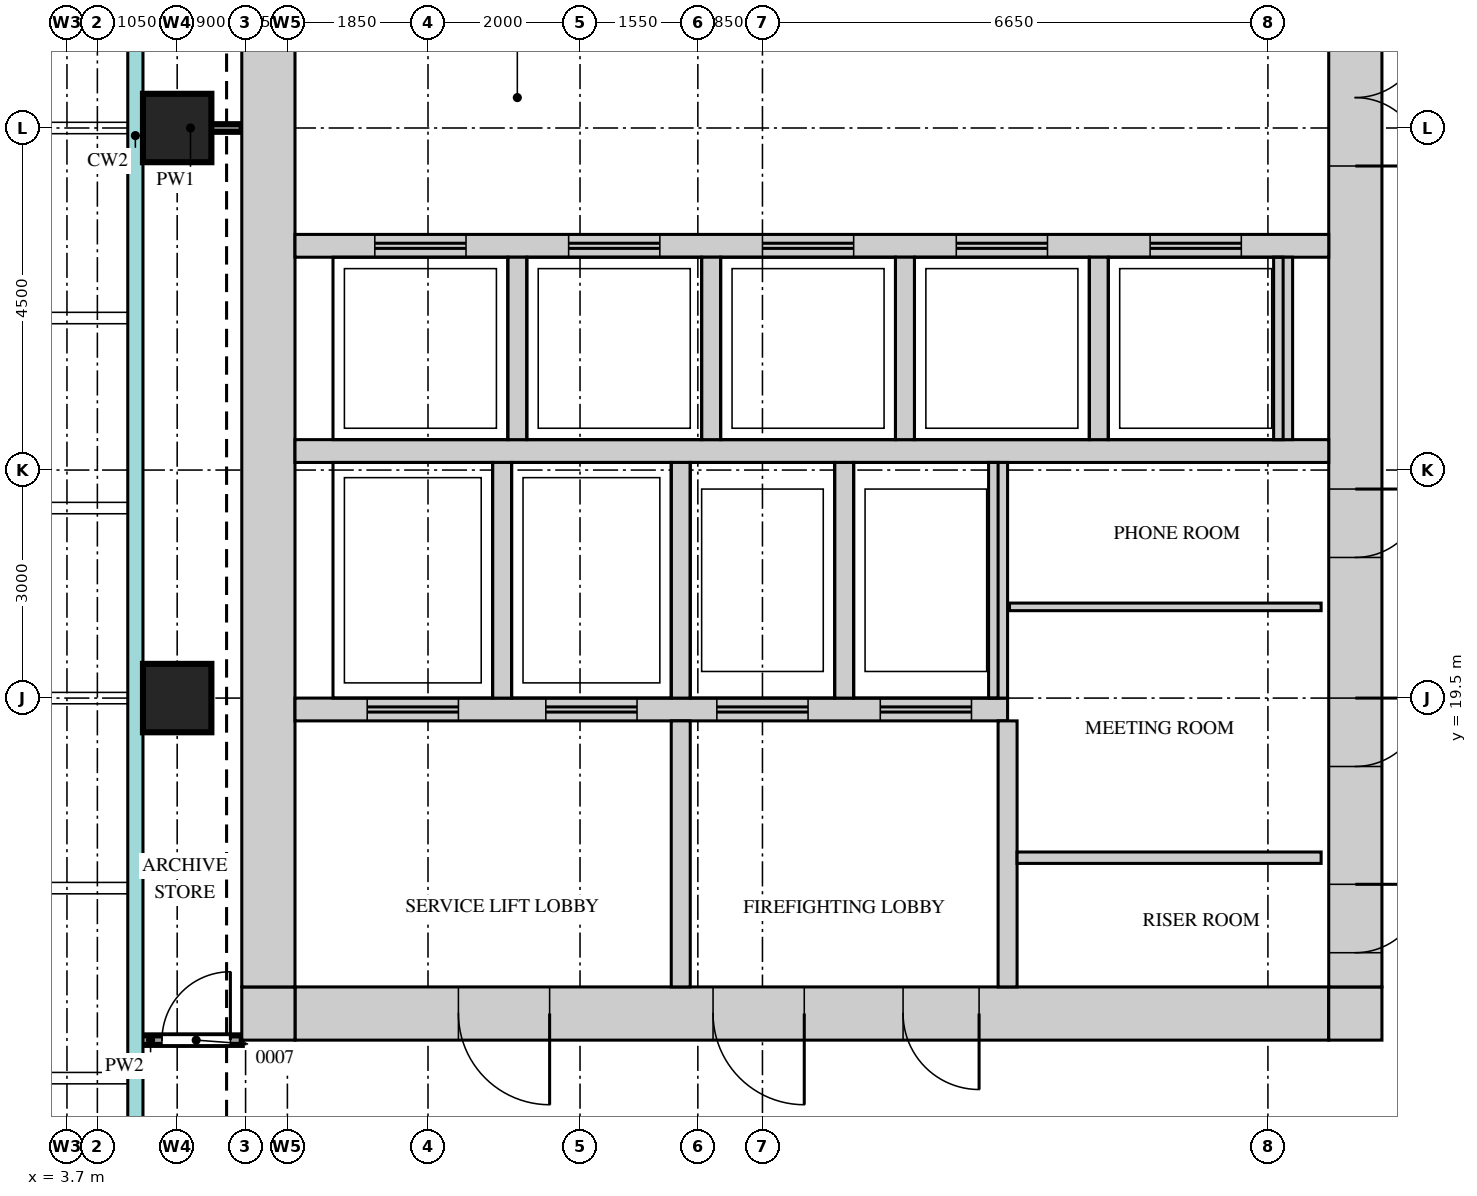
"""IFC4 building model, lengths in metres.
Left out: names, types, materials, properties, quantities, classifications, styles, units other than length and angle.
Written with IfcOpenShell. Run it as: python <this file> out.ifc"""

import sys

from ifc_helpers import new_model, si_unit, direction, frame, frame_2d, origin, origin_2d, place, context, subcontext, project, spatial, rectangle, extrude, source, transform, mapped, element, fill, save


model = new_model("IFC4")
c1 = context("Model", 3, precision=1e-05, world=origin(), true_north=direction((0.0, 1.0)))
c2 = subcontext(c1, "Body", "Model", "MODEL_VIEW")
j1 = project(units=[si_unit("LENGTHUNIT", "METRE"), si_unit("PLANEANGLEUNIT", "RADIAN")], contexts=[c1])
p1 = place(None, origin())
s1 = spatial("IfcSite", under=j1, at=p1, CompositionType="ELEMENT")
p2 = place(p1, origin())
s2 = spatial("IfcBuilding", under=s1, at=p2, CompositionType="ELEMENT")
p3 = place(p2, frame((0.0, 0.0, 222.2)))
s3 = spatial("IfcBuildingStorey", under=s2, at=p3, CompositionType="ELEMENT", Elevation=222.2)
m1 = source(origin(), c2, "Body", "SweptSolid", [
    extrude(rectangle(XDim=13.6, YDim=0.7, at=frame_2d((6.8, 0.0))), origin(), (0.0, 0.0, 1.0), 3.75),
])
p4 = place(p3, frame((6.7, 15.35, 0.0), z_axis=(0.0, 0.0, 1.0), x_axis=(1.0, 0.0, 0.0)))
e1 = element("IfcWall", 1, at=p4, inside=s3, PredefinedType="SHEAR", context=c2, shape_type="MappedRepresentation", body=[
    mapped(m1, transform((0.0, 0.0, 0.0))),
])
m2 = source(origin(), c2, "Body", "SweptSolid", [
    extrude(rectangle(XDim=1.2, YDim=2.1, at=frame_2d((0.6, 1.05))), frame((0.0, 0.36, 0.0), z_axis=(0.0, -1.0, 0.0), x_axis=(1.0, 0.0, 0.0)), (0.0, 0.0, 1.0), 0.72),
])
p5 = place(p4, frame((5.5, 0.0, 0.0)))
e2 = element("IfcOpeningElement", 2, at=p5, cuts=e1, PredefinedType="OPENING", context=c2, shape_type="MappedRepresentation", body=[
    mapped(m2, transform((0.0, 0.0, 0.0))),
])
p6 = place(p4, frame((2.15, 0.0, 0.0)))
e3 = element("IfcOpeningElement", 3, at=p6, cuts=e1, PredefinedType="OPENING", context=c2, shape_type="MappedRepresentation", body=[
    mapped(m2, transform((0.0, 0.0, 0.0))),
])
m3 = source(origin(), c2, "Body", "SweptSolid", [
    extrude(rectangle(XDim=1.0, YDim=2.1, at=frame_2d((0.5, 1.05))), frame((0.0, 0.36, 0.0), z_axis=(0.0, -1.0, 0.0), x_axis=(1.0, 0.0, 0.0)), (0.0, 0.0, 1.0), 0.72),
])
p7 = place(p4, frame((8.0, 0.0, 0.0)))
e4 = element("IfcOpeningElement", 4, at=p7, cuts=e1, PredefinedType="OPENING", context=c2, shape_type="MappedRepresentation", body=[
    mapped(m3, transform((0.0, 0.0, 0.0))),
])
m4 = source(origin(), c2, "Body", "SweptSolid", [
    extrude(rectangle(XDim=0.7, YDim=0.7, at=frame_2d((0.35, 0.0))), origin(), (0.0, 0.0, 1.0), 3.75),
])
for number, where, z_axis, x_axis in (
    (5, (20.3, 15.35, 0.0), (0.0, 0.0, 1.0), (1.0, 0.0, 0.0)),
    (6, (6.0, 15.35, 0.0), (0.0, 0.0, 1.0), (1.0, 0.0, 0.0)),
):
    element("IfcWall", number, at=place(p3, frame(where, z_axis=z_axis, x_axis=x_axis)), inside=s3, PredefinedType="SHEAR", context=c2, shape_type="MappedRepresentation", body=[
        mapped(m4, transform((0.0, 0.0, 0.0))),
    ])
m5 = source(origin(), c2, "Body", "SweptSolid", [
    extrude(rectangle(XDim=22.6, YDim=0.7, at=frame_2d((11.3, 0.0))), origin(), (0.0, 0.0, 1.0), 3.75),
])
p8 = place(p3, frame((20.65, 15.7, 0.0), z_axis=(0.0, 0.0, 1.0), x_axis=(0.0, 1.0, 0.0)))
e7 = element("IfcWall", 7, at=p8, inside=s3, PredefinedType="SHEAR", context=c2, shape_type="MappedRepresentation", body=[
    mapped(m5, transform((0.0, 0.0, 0.0))),
])
m6 = source(origin(), c2, "Body", "SweptSolid", [
    extrude(rectangle(XDim=1.8, YDim=2.1, at=frame_2d((0.9, 1.05))), frame((0.0, 0.36, 0.0), z_axis=(0.0, -1.0, 0.0), x_axis=(1.0, 0.0, 0.0)), (0.0, 0.0, 1.0), 0.72),
])
p9 = place(p8, frame((10.8, 0.0, 0.0)))
e8 = element("IfcOpeningElement", 8, at=p9, cuts=e7, PredefinedType="OPENING", context=c2, shape_type="MappedRepresentation", body=[
    mapped(m6, transform((0.0, 0.0, 0.0))),
])
m7 = source(origin(), c2, "Body", "SweptSolid", [
    extrude(rectangle(XDim=0.9, YDim=2.1, at=frame_2d((0.45, 1.05))), frame((0.0, 0.36, 0.0), z_axis=(0.0, -1.0, 0.0), x_axis=(1.0, 0.0, 0.0)), (0.0, 0.0, 1.0), 0.72),
])
p10 = place(p8, frame((0.45, 0.0, 0.0)))
e9 = element("IfcOpeningElement", 9, at=p10, cuts=e7, PredefinedType="OPENING", context=c2, shape_type="MappedRepresentation", body=[
    mapped(m7, transform((0.0, 0.0, 0.0))),
])
p11 = place(p8, frame((2.9, 0.0, 0.0)))
e10 = element("IfcOpeningElement", 10, at=p11, cuts=e7, PredefinedType="OPENING", context=c2, shape_type="MappedRepresentation", body=[
    mapped(m7, transform((0.0, 0.0, 0.0))),
])
p12 = place(p8, frame((5.65, 0.0, 0.0)))
e11 = element("IfcOpeningElement", 11, at=p12, cuts=e7, PredefinedType="OPENING", context=c2, shape_type="MappedRepresentation", body=[
    mapped(m7, transform((0.0, 0.0, 0.0))),
])
p13 = place(p3, frame((6.35, 15.7, 0.0), z_axis=(0.0, 0.0, 1.0), x_axis=(0.0, 1.0, 0.0)))
e12 = element("IfcWall", 12, at=p13, inside=s3, PredefinedType="SHEAR", context=c2, shape_type="MappedRepresentation", body=[
    mapped(m5, transform((0.0, 0.0, 0.0))),
])
m8 = source(origin(), c2, "Body", "SweptSolid", [
    extrude(rectangle(XDim=13.6, YDim=0.3, at=frame_2d((6.8, 0.0))), origin(), (0.0, 0.0, 1.0), 3.75),
])
p14 = place(p3, frame((6.7, 22.75, 0.0), z_axis=(0.0, 0.0, 1.0), x_axis=(1.0, 0.0, 0.0)))
e13 = element("IfcWall", 13, at=p14, inside=s3, PredefinedType="STANDARD", context=c2, shape_type="MappedRepresentation", body=[
    mapped(m8, transform((0.0, 0.0, 0.0))),
])
m9 = source(origin(), c2, "Body", "SweptSolid", [
    extrude(rectangle(XDim=9.375, YDim=0.3, at=frame_2d((4.688, 0.0))), origin(), (0.0, 0.0, 1.0), 3.75),
])
p15 = place(p3, frame((6.7, 19.35, 0.0), z_axis=(0.0, 0.0, 1.0), x_axis=(1.0, 0.0, 0.0)))
e14 = element("IfcWall", 14, at=p15, inside=s3, PredefinedType="STANDARD", context=c2, shape_type="MappedRepresentation", body=[
    mapped(m9, transform((0.0, 0.0, 0.0))),
])
m10 = source(origin(), c2, "Body", "SweptSolid", [
    extrude(rectangle(XDim=1.2, YDim=2.1, at=frame_2d((0.6, 1.05))), frame((0.0, 0.16, 0.0), z_axis=(0.0, -1.0, 0.0), x_axis=(1.0, 0.0, 0.0)), (0.0, 0.0, 1.0), 0.32),
])
p16 = place(p15, frame((0.95, 0.0, 0.0)))
e15 = element("IfcOpeningElement", 15, at=p16, cuts=e14, PredefinedType="OPENING", context=c2, shape_type="MappedRepresentation", body=[
    mapped(m10, transform((0.0, 0.0, 0.0))),
])
p17 = place(p15, frame((3.3, 0.0, 0.0)))
e16 = element("IfcOpeningElement", 16, at=p17, cuts=e14, PredefinedType="OPENING", context=c2, shape_type="MappedRepresentation", body=[
    mapped(m10, transform((0.0, 0.0, 0.0))),
])
p18 = place(p15, frame((5.55, 0.0, 0.0)))
e17 = element("IfcOpeningElement", 17, at=p18, cuts=e14, PredefinedType="OPENING", context=c2, shape_type="MappedRepresentation", body=[
    mapped(m10, transform((0.0, 0.0, 0.0))),
])
p19 = place(p15, frame((7.7, 0.0, 0.0)))
e18 = element("IfcOpeningElement", 18, at=p19, cuts=e14, PredefinedType="OPENING", context=c2, shape_type="MappedRepresentation", body=[
    mapped(m10, transform((0.0, 0.0, 0.0))),
])
p20 = place(p3, frame((6.7, 25.45, 0.0), z_axis=(0.0, 0.0, 1.0), x_axis=(1.0, 0.0, 0.0)))
e19 = element("IfcWall", 19, at=p20, inside=s3, PredefinedType="STANDARD", context=c2, shape_type="MappedRepresentation", body=[
    mapped(m8, transform((0.0, 0.0, 0.0))),
])
p21 = place(p20, frame((1.05, 0.0, 0.0)))
e20 = element("IfcOpeningElement", 20, at=p21, cuts=e19, PredefinedType="OPENING", context=c2, shape_type="MappedRepresentation", body=[
    mapped(m10, transform((0.0, 0.0, 0.0))),
])
p22 = place(p20, frame((3.6, 0.0, 0.0)))
e21 = element("IfcOpeningElement", 21, at=p22, cuts=e19, PredefinedType="OPENING", context=c2, shape_type="MappedRepresentation", body=[
    mapped(m10, transform((0.0, 0.0, 0.0))),
])
p23 = place(p20, frame((6.15, 0.0, 0.0)))
e22 = element("IfcOpeningElement", 22, at=p23, cuts=e19, PredefinedType="OPENING", context=c2, shape_type="MappedRepresentation", body=[
    mapped(m10, transform((0.0, 0.0, 0.0))),
])
p24 = place(p20, frame((8.7, 0.0, 0.0)))
e23 = element("IfcOpeningElement", 23, at=p24, cuts=e19, PredefinedType="OPENING", context=c2, shape_type="MappedRepresentation", body=[
    mapped(m10, transform((0.0, 0.0, 0.0))),
])
p25 = place(p20, frame((11.25, 0.0, 0.0)))
e24 = element("IfcOpeningElement", 24, at=p25, cuts=e19, PredefinedType="OPENING", context=c2, shape_type="MappedRepresentation", body=[
    mapped(m10, transform((0.0, 0.0, 0.0))),
])
m11 = source(origin(), c2, "Body", "SweptSolid", [
    extrude(rectangle(XDim=3.1, YDim=0.25, at=frame_2d((1.55, 0.0))), origin(), (0.0, 0.0, 1.0), 3.75),
])
for number, where, z_axis, x_axis in (
    (25, (9.425, 19.5, 0.0), (0.0, 0.0, 1.0), (0.0, 1.0, 0.0)),
    (26, (11.775, 19.5, 0.0), (0.0, 0.0, 1.0), (0.0, 1.0, 0.0)),
    (27, (13.925, 19.5, 0.0), (0.0, 0.0, 1.0), (0.0, 1.0, 0.0)),
    (28, (15.95, 19.5, 0.0), (0.0, 0.0, 1.0), (0.0, 1.0, 0.0)),
):
    element("IfcWall", number, at=place(p3, frame(where, z_axis=z_axis, x_axis=x_axis)), inside=s3, PredefinedType="STANDARD", context=c2, shape_type="MappedRepresentation", body=[
        mapped(m11, transform((0.0, 0.0, 0.0))),
    ])
m12 = source(origin(), c2, "Body", "SweptSolid", [
    extrude(rectangle(XDim=2.4, YDim=0.25, at=frame_2d((1.2, 0.0))), origin(), (0.0, 0.0, 1.0), 3.75),
])
for number, where, z_axis, x_axis in (
    (29, (17.275, 22.9, 0.0), (0.0, 0.0, 1.0), (0.0, 1.0, 0.0)),
    (30, (19.7, 22.9, 0.0), (0.0, 0.0, 1.0), (0.0, 1.0, 0.0)),
    (31, (9.625, 22.9, 0.0), (0.0, 0.0, 1.0), (0.0, 1.0, 0.0)),
    (32, (12.175, 22.9, 0.0), (0.0, 0.0, 1.0), (0.0, 1.0, 0.0)),
    (33, (14.725, 22.9, 0.0), (0.0, 0.0, 1.0), (0.0, 1.0, 0.0)),
):
    element("IfcWall", number, at=place(p3, frame(where, z_axis=z_axis, x_axis=x_axis)), inside=s3, PredefinedType="STANDARD", context=c2, shape_type="MappedRepresentation", body=[
        mapped(m12, transform((0.0, 0.0, 0.0))),
    ])
m13 = source(origin(), c2, "Body", "SweptSolid", [
    extrude(rectangle(XDim=3.5, YDim=0.25, at=frame_2d((1.75, 0.0))), origin(), (0.0, 0.0, 1.0), 3.75),
])
for number, where, z_axis, x_axis in (
    (34, (16.075, 15.7, 0.0), (0.0, 0.0, 1.0), (0.0, 1.0, 0.0)),
    (35, (11.775, 15.7, 0.0), (0.0, 0.0, 1.0), (0.0, 1.0, 0.0)),
):
    element("IfcWall", number, at=place(p3, frame(where, z_axis=z_axis, x_axis=x_axis)), inside=s3, PredefinedType="STANDARD", context=c2, shape_type="MappedRepresentation", body=[
        mapped(m13, transform((0.0, 0.0, 0.0))),
    ])
m14 = source(origin(), c2, "Body", "SweptSolid", [
    extrude(rectangle(XDim=0.9, YDim=0.9, at=origin_2d()), origin(), (0.0, 0.0, 1.0), 3.75),
])
for number, where, z_axis, x_axis in (
    (36, (5.15, 19.5, 0.0), (0.0, 0.0, 1.0), (1.0, 0.0, 0.0)),
    (37, (5.15, 27.0, 0.0), (0.0, 0.0, 1.0), (1.0, 0.0, 0.0)),
):
    element("IfcColumn", number, at=place(p3, frame(where, z_axis=z_axis, x_axis=x_axis)), inside=s3, PredefinedType="COLUMN", context=c2, shape_type="MappedRepresentation", body=[
        mapped(m14, transform((0.0, 0.0, 0.0))),
    ])
m15 = source(origin(), c2, "Body", "SweptSolid", [
    extrude(rectangle(XDim=1.35, YDim=0.125, at=frame_2d((0.675, 0.0))), origin(), (0.0, 0.0, 1.0), 3.8),
])
p26 = place(p3, frame((4.65, 15.0, 0.0), z_axis=(0.0, 0.0, 1.0), x_axis=(1.0, 0.0, 0.0)))
e38 = element("IfcWall", 38, at=p26, inside=s3, PredefinedType="PARTITIONING", context=c2, shape_type="MappedRepresentation", body=[
    mapped(m15, transform((0.0, 0.0, 0.0))),
])
m16 = source(origin(), c2, "Body", "SweptSolid", [
    extrude(rectangle(XDim=0.9, YDim=2.1, at=frame_2d((0.45, 1.05))), frame((0.0, 0.073, 0.0), z_axis=(0.0, -1.0, 0.0), x_axis=(1.0, 0.0, 0.0)), (0.0, 0.0, 1.0), 0.145),
])
p27 = place(p26, frame((0.3, 0.0, 0.0)))
e39 = element("IfcOpeningElement", 39, at=p27, cuts=e38, PredefinedType="OPENING", context=c2, shape_type="MappedRepresentation", body=[
    mapped(m16, transform((0.0, 0.0, 0.0))),
])
m17 = source(origin(), c2, "Body", "SweptSolid", [
    extrude(rectangle(XDim=4.0, YDim=0.15, at=frame_2d((2.0, 0.0))), origin(), (0.0, 0.0, 1.0), 3.8),
])
p28 = place(p3, frame((16.2, 17.4, 0.0), z_axis=(0.0, 0.0, 1.0), x_axis=(1.0, 0.0, 0.0)))
e40 = element("IfcWall", 40, at=p28, inside=s3, PredefinedType="PARTITIONING", context=c2, shape_type="MappedRepresentation", body=[
    mapped(m17, transform((0.0, 0.0, 0.0))),
])
m18 = source(origin(), c2, "Body", "SweptSolid", [
    extrude(rectangle(XDim=4.1, YDim=0.1, at=frame_2d((2.05, 0.0))), origin(), (0.0, 0.0, 1.0), 3.8),
])
p29 = place(p3, frame((16.1, 20.7, 0.0), z_axis=(0.0, 0.0, 1.0), x_axis=(1.0, 0.0, 0.0)))
e41 = element("IfcWall", 41, at=p29, inside=s3, PredefinedType="PARTITIONING", context=c2, shape_type="MappedRepresentation", body=[
    mapped(m18, transform((0.0, 0.0, 0.0))),
])
m19 = source(origin(), c2, "Body", "SweptSolid", [
    extrude(rectangle(XDim=1.35, YDim=0.1, at=frame_2d((0.675, 0.0))), origin(), (0.0, 0.0, 1.0), 3.8),
])
p30 = place(p3, frame((4.65, 27.0, 0.0), z_axis=(0.0, 0.0, 1.0), x_axis=(1.0, 0.0, 0.0)))
e42 = element("IfcWall", 42, at=p30, inside=s3, PredefinedType="PARTITIONING", context=c2, shape_type="MappedRepresentation", body=[
    mapped(m19, transform((0.0, 0.0, 0.0))),
])
m20 = source(origin(), c2, "Body", "SweptSolid", [
    extrude(rectangle(XDim=1.8, YDim=2.1, at=frame_2d((0.9, 1.05))), frame((0.0, 0.3, 0.0), z_axis=(0.0, -1.0, 0.0), x_axis=(1.0, 0.0, 0.0)), (0.0, 0.0, 1.0), 0.6),
])
p31 = place(p9, origin())
e43 = element("IfcDoor", 43, at=p31, inside=s3, OperationType="DOUBLE_DOOR_SINGLE_SWING", PredefinedType="DOOR", context=c2, shape_type="MappedRepresentation", body=[
    mapped(m20, transform((0.0, 0.0, 0.0))),
])
fill(e8, e43)
m21 = source(origin(), c2, "Body", "SweptSolid", [
    extrude(rectangle(XDim=0.9, YDim=2.1, at=frame_2d((0.45, 1.05))), frame((0.0, 0.3, 0.0), z_axis=(0.0, -1.0, 0.0), x_axis=(1.0, 0.0, 0.0)), (0.0, 0.0, 1.0), 0.6),
])
p32 = place(p10, origin())
e44 = element("IfcDoor", 44, at=p32, inside=s3, OperationType="SINGLE_SWING_RIGHT", PredefinedType="DOOR", context=c2, shape_type="MappedRepresentation", body=[
    mapped(m21, transform((0.0, 0.0, 0.0))),
])
fill(e9, e44)
p33 = place(p11, origin())
e45 = element("IfcDoor", 45, at=p33, inside=s3, OperationType="SINGLE_SWING_RIGHT", PredefinedType="DOOR", context=c2, shape_type="MappedRepresentation", body=[
    mapped(m21, transform((0.0, 0.0, 0.0))),
])
fill(e10, e45)
p34 = place(p12, origin())
e46 = element("IfcDoor", 46, at=p34, inside=s3, OperationType="SINGLE_SWING_RIGHT", PredefinedType="DOOR", context=c2, shape_type="MappedRepresentation", body=[
    mapped(m21, transform((0.0, 0.0, 0.0))),
])
fill(e11, e46)
m22 = source(origin(), c2, "Body", "SweptSolid", [
    extrude(rectangle(XDim=1.2, YDim=2.1, at=frame_2d((0.6, 1.05))), frame((0.0, 0.3, 0.0), z_axis=(0.0, -1.0, 0.0), x_axis=(1.0, 0.0, 0.0)), (0.0, 0.0, 1.0), 0.6),
])
p35 = place(p5, origin())
e47 = element("IfcDoor", 47, at=p35, inside=s3, OperationType="SINGLE_SWING_RIGHT", PredefinedType="DOOR", context=c2, shape_type="MappedRepresentation", body=[
    mapped(m22, transform((0.0, 0.0, 0.0))),
])
fill(e2, e47)
p36 = place(p6, origin())
e48 = element("IfcDoor", 48, at=p36, inside=s3, OperationType="SINGLE_SWING_RIGHT", PredefinedType="DOOR", context=c2, shape_type="MappedRepresentation", body=[
    mapped(m22, transform((0.0, 0.0, 0.0))),
])
fill(e3, e48)
m23 = source(origin(), c2, "Body", "SweptSolid", [
    extrude(rectangle(XDim=1.0, YDim=2.1, at=frame_2d((0.5, 1.05))), frame((0.0, 0.3, 0.0), z_axis=(0.0, -1.0, 0.0), x_axis=(1.0, 0.0, 0.0)), (0.0, 0.0, 1.0), 0.6),
])
p37 = place(p7, origin())
e49 = element("IfcDoor", 49, at=p37, inside=s3, OperationType="SINGLE_SWING_RIGHT", PredefinedType="DOOR", context=c2, shape_type="MappedRepresentation", body=[
    mapped(m23, transform((0.0, 0.0, 0.0))),
])
fill(e4, e49)
m24 = source(origin(), c2, "Body", "SweptSolid", [
    extrude(rectangle(XDim=0.9, YDim=2.1, at=frame_2d((0.45, 1.05))), frame((0.0, 0.025, 0.0), z_axis=(0.0, -1.0, 0.0), x_axis=(1.0, 0.0, 0.0)), (0.0, 0.0, 1.0), 0.05),
])
p38 = place(p27, origin())
e50 = element("IfcDoor", 50, at=p38, inside=s3, OperationType="SINGLE_SWING_LEFT", PredefinedType="DOOR", context=c2, shape_type="MappedRepresentation", body=[
    mapped(m24, transform((0.0, 0.0, 0.0))),
])
fill(e39, e50)
m25 = source(origin(), c2, "Body", "SweptSolid", [
    extrude(rectangle(XDim=1.2, YDim=2.1, at=frame_2d((0.6, 1.05))), frame((0.0, 0.025, 0.0), z_axis=(0.0, -1.0, 0.0), x_axis=(1.0, 0.0, 0.0)), (0.0, 0.0, 1.0), 0.05),
])
p39 = place(p21, origin())
e51 = element("IfcDoor", 51, at=p39, inside=s3, OperationType="DOUBLE_DOOR_SLIDING", PredefinedType="DOOR", context=c2, shape_type="MappedRepresentation", body=[
    mapped(m25, transform((0.0, 0.0, 0.0))),
])
fill(e20, e51)
p40 = place(p22, origin())
e52 = element("IfcDoor", 52, at=p40, inside=s3, OperationType="DOUBLE_DOOR_SLIDING", PredefinedType="DOOR", context=c2, shape_type="MappedRepresentation", body=[
    mapped(m25, transform((0.0, 0.0, 0.0))),
])
fill(e21, e52)
p41 = place(p23, origin())
e53 = element("IfcDoor", 53, at=p41, inside=s3, OperationType="DOUBLE_DOOR_SLIDING", PredefinedType="DOOR", context=c2, shape_type="MappedRepresentation", body=[
    mapped(m25, transform((0.0, 0.0, 0.0))),
])
fill(e22, e53)
p42 = place(p24, origin())
e54 = element("IfcDoor", 54, at=p42, inside=s3, OperationType="DOUBLE_DOOR_SLIDING", PredefinedType="DOOR", context=c2, shape_type="MappedRepresentation", body=[
    mapped(m25, transform((0.0, 0.0, 0.0))),
])
fill(e23, e54)
p43 = place(p25, origin())
e55 = element("IfcDoor", 55, at=p43, inside=s3, OperationType="DOUBLE_DOOR_SLIDING", PredefinedType="DOOR", context=c2, shape_type="MappedRepresentation", body=[
    mapped(m25, transform((0.0, 0.0, 0.0))),
])
fill(e24, e55)
p44 = place(p16, origin())
e56 = element("IfcDoor", 56, at=p44, inside=s3, OperationType="DOUBLE_DOOR_SLIDING", PredefinedType="DOOR", context=c2, shape_type="MappedRepresentation", body=[
    mapped(m25, transform((0.0, 0.0, 0.0))),
])
fill(e15, e56)
p45 = place(p17, origin())
e57 = element("IfcDoor", 57, at=p45, inside=s3, OperationType="DOUBLE_DOOR_SLIDING", PredefinedType="DOOR", context=c2, shape_type="MappedRepresentation", body=[
    mapped(m25, transform((0.0, 0.0, 0.0))),
])
fill(e16, e57)
p46 = place(p18, origin())
e58 = element("IfcDoor", 58, at=p46, inside=s3, OperationType="DOUBLE_DOOR_SLIDING", PredefinedType="DOOR", context=c2, shape_type="MappedRepresentation", body=[
    mapped(m25, transform((0.0, 0.0, 0.0))),
])
fill(e17, e58)
p47 = place(p19, origin())
e59 = element("IfcDoor", 59, at=p47, inside=s3, OperationType="DOUBLE_DOOR_SLIDING", PredefinedType="DOOR", context=c2, shape_type="MappedRepresentation", body=[
    mapped(m25, transform((0.0, 0.0, 0.0))),
])
fill(e18, e59)
save(model, sys.argv[1])
